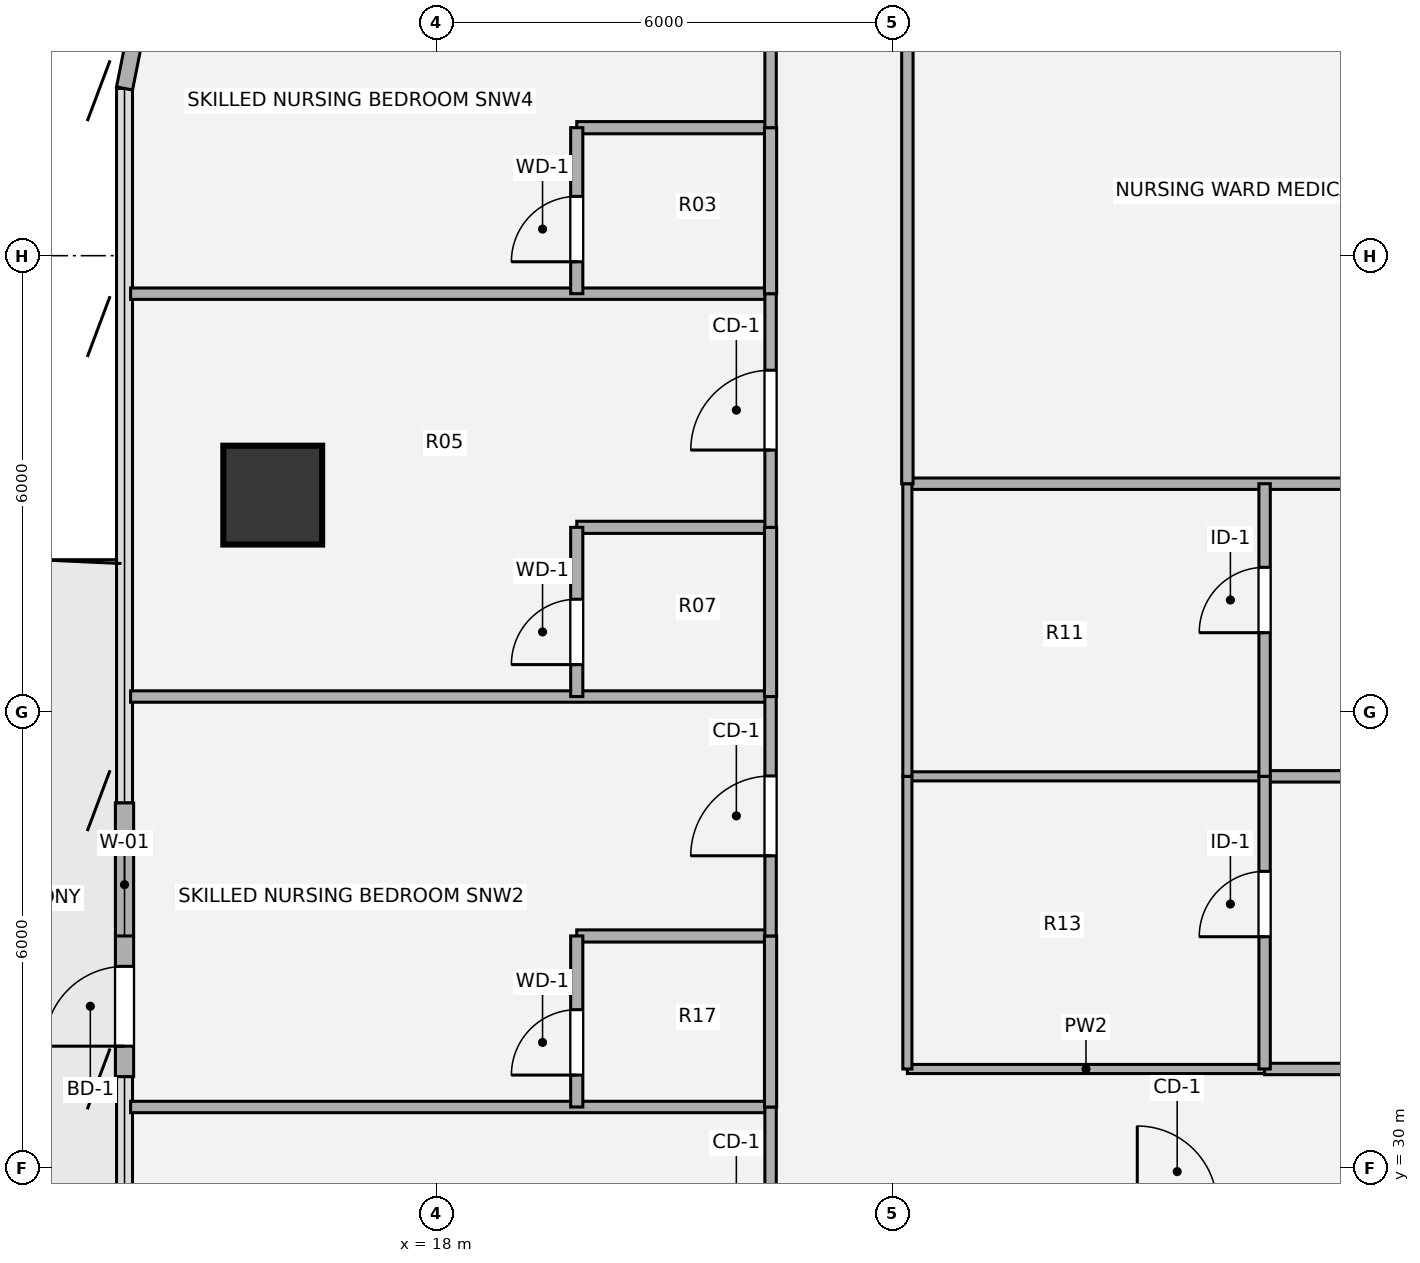
"""IFC4 building model, lengths in metres.
Left out: names, types, materials, properties, quantities, classifications, styles, units other than length and angle.
Written with IfcOpenShell. Run it as: python <this file> out.ifc"""

import sys

from ifc_helpers import new_model, si_unit, direction, frame, frame_2d, origin, origin_2d, place, context, subcontext, project, spatial, rectangle, hollow_circle, extrude, source, transform, mapped, element, fill, save


model = new_model("IFC4")
c1 = context("Model", 3, precision=1e-05, world=origin(), true_north=direction((0.0, 1.0)))
c2 = subcontext(c1, "Body", "Model", "MODEL_VIEW")
j1 = project(units=[si_unit("LENGTHUNIT", "METRE"), si_unit("PLANEANGLEUNIT", "RADIAN")], contexts=[c1])
p1 = place(None, origin())
s1 = spatial("IfcSite", under=j1, at=p1, CompositionType="ELEMENT")
p2 = place(p1, origin())
s2 = spatial("IfcBuilding", under=s1, at=p2, CompositionType="ELEMENT")
p3 = place(p2, frame((0.0, 0.0, 131.4)))
s3 = spatial("IfcBuildingStorey", under=s2, at=p3, CompositionType="ELEMENT", Elevation=131.4)
m1 = source(origin(), c2, "Body", "SweptSolid", [
    extrude(hollow_circle(Radius=0.65, WallThickness=0.045, at=origin_2d()), origin(), (0.0, 0.0, 1.0), 3.78),
])
p4 = place(p3, frame((15.85, 38.85, 0.0), z_axis=(0.0, 0.0, 1.0), x_axis=(1.0, 0.0, 0.0)))
e1 = element("IfcColumn", 1, at=p4, inside=s3, PredefinedType="COLUMN", context=c2, shape_type="MappedRepresentation", body=[
    mapped(m1, transform((0.0, 0.0, 0.0), x_axis=(1.0, 0.0, 0.0), y_axis=(0.0, 1.0, 0.0), z_axis=(0.0, 0.0, 1.0), scale=1.0)),
])
p5 = place(p3, frame((13.9, 31.2, 0.0), z_axis=(0.0, 0.0, 1.0), x_axis=(0.0, 1.0, 0.0)))
e2 = element("IfcWall", 2, at=p5, inside=s3, PredefinedType="SOLIDWALL", context=c2, shape_type="SweptSolid", body=[
    extrude(rectangle(XDim=3.6, YDim=0.24, at=frame_2d((1.8, 0.0))), origin(), (0.0, 0.0, 1.0), 3.53),
])
p6 = place(p5, frame((0.4, 0.0, 0.0)))
e3 = element("IfcOpeningElement", 3, at=p6, cuts=e2, PredefinedType="OPENING", context=c2, shape_type="SweptSolid", body=[
    extrude(rectangle(XDim=1.05, YDim=2.15, at=origin_2d()), frame((0.525, 0.13, 1.075), z_axis=(0.0, -1.0, 0.0), x_axis=(1.0, 0.0, 0.0)), (0.0, 0.0, 1.0), 0.26),
])
p7 = place(p5, frame((1.85, 0.0, 0.85)))
e4 = element("IfcOpeningElement", 4, at=p7, cuts=e2, PredefinedType="OPENING", context=c2, shape_type="SweptSolid", body=[
    extrude(rectangle(XDim=1.35, YDim=1.35, at=origin_2d()), frame((0.675, 0.13, 0.675), z_axis=(0.0, -1.0, 0.0), x_axis=(1.0, 0.0, 0.0)), (0.0, 0.0, 1.0), 0.26),
])
p8 = place(p3, frame((13.9, 44.2, 0.0), z_axis=(0.0, 0.0, 1.0), x_axis=(0.195138390419, 0.980775717779, 0.0)))
e5 = element("IfcWall", 5, at=p8, inside=s3, PredefinedType="SOLIDWALL", context=c2, shape_type="SweptSolid", body=[
    extrude(rectangle(XDim=1.249, YDim=0.215, at=frame_2d((0.624, 0.0))), origin(), (0.0, 0.0, 1.0), 3.53),
])
p9 = place(p3, frame((13.98, 30.8, 0.0), z_axis=(0.0, 0.0, 1.0), x_axis=(1.0, 0.0, 0.0)))
e6 = element("IfcWall", 6, at=p9, inside=s3, PredefinedType="PARTITIONING", context=c2, shape_type="SweptSolid", body=[
    extrude(rectangle(XDim=8.42, YDim=0.15, at=frame_2d((4.21, 0.0))), origin(), (0.0, 0.0, 1.0), 2.982),
])
p10 = place(p3, frame((24.2, 31.3, 0.0), z_axis=(0.0, 0.0, 1.0), x_axis=(1.0, 0.0, 0.0)))
e7 = element("IfcWall", 7, at=p10, inside=s3, PredefinedType="PARTITIONING", context=c2, shape_type="SweptSolid", body=[
    extrude(rectangle(XDim=4.7, YDim=0.12, at=frame_2d((2.35, 0.0))), origin(), (0.0, 0.0, 1.0), 2.982),
])
p11 = place(p3, frame((28.9, 31.3, 0.0), z_axis=(0.0, 0.0, 1.0), x_axis=(1.0, 0.0, 0.0)))
e8 = element("IfcWall", 8, at=p11, inside=s3, PredefinedType="PARTITIONING", context=c2, shape_type="SweptSolid", body=[
    extrude(rectangle(XDim=6.2, YDim=0.15, at=frame_2d((3.1, 0.0))), origin(), (0.0, 0.0, 1.0), 2.982),
])
p12 = place(p3, frame((19.85, 33.05, 0.0), z_axis=(0.0, 0.0, 1.0), x_axis=(1.0, 0.0, 0.0)))
e9 = element("IfcWall", 9, at=p12, inside=s3, PredefinedType="PLUMBINGWALL", context=c2, shape_type="SweptSolid", body=[
    extrude(rectangle(XDim=2.55, YDim=0.16, at=frame_2d((1.275, 0.0))), origin(), (0.0, 0.0, 1.0), 2.982),
])
p13 = place(p3, frame((24.2, 35.15, 0.0), z_axis=(0.0, 0.0, 1.0), x_axis=(1.0, 0.0, 0.0)))
e10 = element("IfcWall", 10, at=p13, inside=s3, PredefinedType="PARTITIONING", context=c2, shape_type="SweptSolid", body=[
    extrude(rectangle(XDim=4.7, YDim=0.12, at=frame_2d((2.35, 0.0))), origin(), (0.0, 0.0, 1.0), 2.982),
])
p14 = place(p3, frame((28.9, 35.15, 0.0), z_axis=(0.0, 0.0, 1.0), x_axis=(1.0, 0.0, 0.0)))
e11 = element("IfcWall", 11, at=p14, inside=s3, PredefinedType="PARTITIONING", context=c2, shape_type="SweptSolid", body=[
    extrude(rectangle(XDim=6.2, YDim=0.15, at=frame_2d((3.1, 0.0))), origin(), (0.0, 0.0, 1.0), 2.982),
])
p15 = place(p3, frame((13.98, 36.2, 0.0), z_axis=(0.0, 0.0, 1.0), x_axis=(1.0, 0.0, 0.0)))
e12 = element("IfcWall", 12, at=p15, inside=s3, PredefinedType="PARTITIONING", context=c2, shape_type="SweptSolid", body=[
    extrude(rectangle(XDim=8.42, YDim=0.15, at=frame_2d((4.21, 0.0))), origin(), (0.0, 0.0, 1.0), 2.982),
])
p16 = place(p3, frame((19.85, 38.426, 0.0), z_axis=(0.0, 0.0, 1.0), x_axis=(1.0, 0.0, 0.0)))
e13 = element("IfcWall", 13, at=p16, inside=s3, PredefinedType="PLUMBINGWALL", context=c2, shape_type="SweptSolid", body=[
    extrude(rectangle(XDim=2.55, YDim=0.16, at=frame_2d((1.275, 0.0))), origin(), (0.0, 0.0, 1.0), 3.055),
])
p17 = place(p3, frame((24.2, 39.0, 0.0), z_axis=(0.0, 0.0, 1.0), x_axis=(1.0, 0.0, 0.0)))
e14 = element("IfcWall", 14, at=p17, inside=s3, PredefinedType="PARTITIONING", context=c2, shape_type="SweptSolid", body=[
    extrude(rectangle(XDim=10.9, YDim=0.15, at=frame_2d((5.45, 0.0))), origin(), (0.0, 0.0, 1.0), 2.903),
])
p18 = place(p3, frame((13.98, 41.5, 0.0), z_axis=(0.0, 0.0, 1.0), x_axis=(1.0, 0.0, 0.0)))
e15 = element("IfcWall", 15, at=p18, inside=s3, PredefinedType="PARTITIONING", context=c2, shape_type="SweptSolid", body=[
    extrude(rectangle(XDim=8.42, YDim=0.15, at=frame_2d((4.21, 0.0))), origin(), (0.0, 0.0, 1.0), 3.5),
])
p19 = place(p3, frame((19.85, 43.684, 0.0), z_axis=(0.0, 0.0, 1.0), x_axis=(1.0, 0.0, 0.0)))
e16 = element("IfcWall", 16, at=p19, inside=s3, PredefinedType="PLUMBINGWALL", context=c2, shape_type="SweptSolid", body=[
    extrude(rectangle(XDim=2.55, YDim=0.16, at=frame_2d((1.275, 0.0))), origin(), (0.0, 0.0, 1.0), 3.5),
])
p20 = place(p3, frame((19.85, 30.8, 0.0), z_axis=(0.0, 0.0, 1.0), x_axis=(0.0, 1.0, 0.0)))
e17 = element("IfcWall", 17, at=p20, inside=s3, PredefinedType="PLUMBINGWALL", context=c2, shape_type="SweptSolid", body=[
    extrude(rectangle(XDim=2.25, YDim=0.16, at=frame_2d((1.125, 0.0))), origin(), (0.0, 0.0, 1.0), 3.5),
])
p21 = place(p20, frame((0.42, 0.0, 0.0)))
e18 = element("IfcOpeningElement", 18, at=p21, cuts=e17, PredefinedType="OPENING", context=c2, shape_type="SweptSolid", body=[
    extrude(rectangle(XDim=0.86, YDim=2.1, at=origin_2d()), frame((0.43, 0.09, 1.05), z_axis=(0.0, -1.0, 0.0), x_axis=(1.0, 0.0, 0.0)), (0.0, 0.0, 1.0), 0.18),
])
p22 = place(p3, frame((19.85, 36.2, 0.0), z_axis=(0.0, 0.0, 1.0), x_axis=(0.0, 1.0, 0.0)))
e19 = element("IfcWall", 19, at=p22, inside=s3, PredefinedType="PLUMBINGWALL", context=c2, shape_type="SweptSolid", body=[
    extrude(rectangle(XDim=2.226, YDim=0.16, at=frame_2d((1.113, 0.0))), origin(), (0.0, 0.0, 1.0), 3.5),
])
p23 = place(p22, frame((0.42, 0.0, 0.0)))
e20 = element("IfcOpeningElement", 20, at=p23, cuts=e19, PredefinedType="OPENING", context=c2, shape_type="SweptSolid", body=[
    extrude(rectangle(XDim=0.86, YDim=2.1, at=origin_2d()), frame((0.43, 0.09, 1.05), z_axis=(0.0, -1.0, 0.0), x_axis=(1.0, 0.0, 0.0)), (0.0, 0.0, 1.0), 0.18),
])
p24 = place(p3, frame((19.85, 41.5, 0.0), z_axis=(0.0, 0.0, 1.0), x_axis=(0.0, 1.0, 0.0)))
e21 = element("IfcWall", 21, at=p24, inside=s3, PredefinedType="PLUMBINGWALL", context=c2, shape_type="SweptSolid", body=[
    extrude(rectangle(XDim=2.184, YDim=0.16, at=frame_2d((1.092, 0.0))), origin(), (0.0, 0.0, 1.0), 3.5),
])
p25 = place(p24, frame((0.42, 0.0, 0.0)))
e22 = element("IfcOpeningElement", 22, at=p25, cuts=e21, PredefinedType="OPENING", context=c2, shape_type="SweptSolid", body=[
    extrude(rectangle(XDim=0.86, YDim=2.1, at=origin_2d()), frame((0.43, 0.09, 1.05), z_axis=(0.0, -1.0, 0.0), x_axis=(1.0, 0.0, 0.0)), (0.0, 0.0, 1.0), 0.18),
])
p26 = place(p3, frame((22.4, 27.65, 0.0), z_axis=(0.0, 0.0, 1.0), x_axis=(0.0, 1.0, 0.0)))
e23 = element("IfcWall", 23, at=p26, inside=s3, PredefinedType="PARTITIONING", context=c2, shape_type="SweptSolid", body=[
    extrude(rectangle(XDim=3.15, YDim=0.15, at=frame_2d((1.575, 0.0))), origin(), (0.0, 0.0, 1.0), 3.5),
])
p27 = place(p26, frame((1.055, 0.0, 0.0)))
e24 = element("IfcOpeningElement", 24, at=p27, cuts=e23, PredefinedType="OPENING", context=c2, shape_type="SweptSolid", body=[
    extrude(rectangle(XDim=1.05, YDim=2.1, at=origin_2d()), frame((0.525, 0.085, 1.05), z_axis=(0.0, -1.0, 0.0), x_axis=(1.0, 0.0, 0.0)), (0.0, 0.0, 1.0), 0.17),
])
p28 = place(p3, frame((22.4, 30.8, 0.0), z_axis=(0.0, 0.0, 1.0), x_axis=(0.0, 1.0, 0.0)))
e25 = element("IfcWall", 25, at=p28, inside=s3, PredefinedType="PLUMBINGWALL", context=c2, shape_type="SweptSolid", body=[
    extrude(rectangle(XDim=2.25, YDim=0.16, at=frame_2d((1.125, 0.0))), origin(), (0.0, 0.0, 1.0), 3.5),
])
p29 = place(p3, frame((22.4, 33.05, 0.0), z_axis=(0.0, 0.0, 1.0), x_axis=(0.0, 1.0, 0.0)))
e26 = element("IfcWall", 26, at=p29, inside=s3, PredefinedType="PARTITIONING", context=c2, shape_type="SweptSolid", body=[
    extrude(rectangle(XDim=3.15, YDim=0.15, at=frame_2d((1.575, 0.0))), origin(), (0.0, 0.0, 1.0), 3.5),
])
p30 = place(p29, frame((1.055, 0.0, 0.0)))
e27 = element("IfcOpeningElement", 27, at=p30, cuts=e26, PredefinedType="OPENING", context=c2, shape_type="SweptSolid", body=[
    extrude(rectangle(XDim=1.05, YDim=2.1, at=origin_2d()), frame((0.525, 0.085, 1.05), z_axis=(0.0, -1.0, 0.0), x_axis=(1.0, 0.0, 0.0)), (0.0, 0.0, 1.0), 0.17),
])
p31 = place(p3, frame((22.4, 36.2, 0.0), z_axis=(0.0, 0.0, 1.0), x_axis=(0.0, 1.0, 0.0)))
e28 = element("IfcWall", 28, at=p31, inside=s3, PredefinedType="PLUMBINGWALL", context=c2, shape_type="SweptSolid", body=[
    extrude(rectangle(XDim=2.226, YDim=0.16, at=frame_2d((1.113, 0.0))), origin(), (0.0, 0.0, 1.0), 3.5),
])
p32 = place(p3, frame((22.4, 38.426, 0.0), z_axis=(0.0, 0.0, 1.0), x_axis=(0.0, 1.0, 0.0)))
e29 = element("IfcWall", 29, at=p32, inside=s3, PredefinedType="PARTITIONING", context=c2, shape_type="SweptSolid", body=[
    extrude(rectangle(XDim=3.074, YDim=0.15, at=frame_2d((1.537, 0.0))), origin(), (0.0, 0.0, 1.0), 3.5),
])
p33 = place(p32, frame((1.017, 0.0, 0.0)))
e30 = element("IfcOpeningElement", 30, at=p33, cuts=e29, PredefinedType="OPENING", context=c2, shape_type="SweptSolid", body=[
    extrude(rectangle(XDim=1.05, YDim=2.1, at=origin_2d()), frame((0.525, 0.085, 1.05), z_axis=(0.0, -1.0, 0.0), x_axis=(1.0, 0.0, 0.0)), (0.0, 0.0, 1.0), 0.17),
])
p34 = place(p3, frame((22.4, 41.5, 0.0), z_axis=(0.0, 0.0, 1.0), x_axis=(0.0, 1.0, 0.0)))
e31 = element("IfcWall", 31, at=p34, inside=s3, PredefinedType="PLUMBINGWALL", context=c2, shape_type="SweptSolid", body=[
    extrude(rectangle(XDim=2.184, YDim=0.16, at=frame_2d((1.092, 0.0))), origin(), (0.0, 0.0, 1.0), 3.5),
])
p35 = place(p3, frame((22.4, 43.684, 0.0), z_axis=(0.0, 0.0, 1.0), x_axis=(0.0, 1.0, 0.0)))
e32 = element("IfcWall", 32, at=p35, inside=s3, PredefinedType="PARTITIONING", context=c2, shape_type="SweptSolid", body=[
    extrude(rectangle(XDim=3.637, YDim=0.15, at=frame_2d((1.818, 0.0))), origin(), (0.0, 0.0, 1.0), 3.5),
])
p36 = place(p35, frame((1.298, 0.0, 0.0)))
e33 = element("IfcOpeningElement", 33, at=p36, cuts=e32, PredefinedType="OPENING", context=c2, shape_type="SweptSolid", body=[
    extrude(rectangle(XDim=1.05, YDim=2.1, at=origin_2d()), frame((0.525, 0.085, 1.05), z_axis=(0.0, -1.0, 0.0), x_axis=(1.0, 0.0, 0.0)), (0.0, 0.0, 1.0), 0.17),
])
p37 = place(p3, frame((24.2, 31.3, 0.0), z_axis=(0.0, 0.0, 1.0), x_axis=(0.0, 1.0, 0.0)))
e34 = element("IfcWall", 34, at=p37, inside=s3, PredefinedType="PARTITIONING", context=c2, shape_type="SweptSolid", body=[
    extrude(rectangle(XDim=3.85, YDim=0.12, at=frame_2d((1.925, 0.0))), origin(), (0.0, 0.0, 1.0), 3.5),
])
p38 = place(p3, frame((24.2, 35.15, 0.0), z_axis=(0.0, 0.0, 1.0), x_axis=(0.0, 1.0, 0.0)))
e35 = element("IfcWall", 35, at=p38, inside=s3, PredefinedType="PARTITIONING", context=c2, shape_type="SweptSolid", body=[
    extrude(rectangle(XDim=3.85, YDim=0.12, at=frame_2d((1.925, 0.0))), origin(), (0.0, 0.0, 1.0), 3.5),
])
p39 = place(p3, frame((24.2, 39.0, 0.0), z_axis=(0.0, 0.0, 1.0), x_axis=(0.0, 1.0, 0.0)))
e36 = element("IfcWall", 36, at=p39, inside=s3, PredefinedType="PARTITIONING", context=c2, shape_type="SweptSolid", body=[
    extrude(rectangle(XDim=8.321, YDim=0.15, at=frame_2d((4.16, 0.0))), origin(), (0.0, 0.0, 1.0), 3.5),
])
p40 = place(p3, frame((28.9, 31.3, 0.0), z_axis=(0.0, 0.0, 1.0), x_axis=(0.0, 1.0, 0.0)))
e37 = element("IfcWall", 37, at=p40, inside=s3, PredefinedType="PARTITIONING", context=c2, shape_type="SweptSolid", body=[
    extrude(rectangle(XDim=3.85, YDim=0.15, at=frame_2d((1.925, 0.0))), origin(), (0.0, 0.0, 1.0), 3.5),
])
p41 = place(p40, frame((1.74, 0.0, 0.0)))
e38 = element("IfcOpeningElement", 38, at=p41, cuts=e37, PredefinedType="OPENING", context=c2, shape_type="SweptSolid", body=[
    extrude(rectangle(XDim=0.86, YDim=2.1, at=origin_2d()), frame((0.43, 0.085, 1.05), z_axis=(0.0, -1.0, 0.0), x_axis=(1.0, 0.0, 0.0)), (0.0, 0.0, 1.0), 0.17),
])
p42 = place(p3, frame((28.9, 35.15, 0.0), z_axis=(0.0, 0.0, 1.0), x_axis=(0.0, 1.0, 0.0)))
e39 = element("IfcWall", 39, at=p42, inside=s3, PredefinedType="PARTITIONING", context=c2, shape_type="SweptSolid", body=[
    extrude(rectangle(XDim=3.85, YDim=0.15, at=frame_2d((1.925, 0.0))), origin(), (0.0, 0.0, 1.0), 3.5),
])
p43 = place(p42, frame((1.89, 0.0, 0.0)))
e40 = element("IfcOpeningElement", 40, at=p43, cuts=e39, PredefinedType="OPENING", context=c2, shape_type="SweptSolid", body=[
    extrude(rectangle(XDim=0.86, YDim=2.1, at=origin_2d()), frame((0.43, 0.085, 1.05), z_axis=(0.0, -1.0, 0.0), x_axis=(1.0, 0.0, 0.0)), (0.0, 0.0, 1.0), 0.17),
])
m2 = source(origin(), c2, "Body", "SweptSolid", [
    extrude(rectangle(XDim=1.05, YDim=2.15, at=origin_2d()), frame((0.525, 0.025, 1.075), z_axis=(0.0, -1.0, 0.0), x_axis=(1.0, 0.0, 0.0)), (0.0, 0.0, 1.0), 0.05),
])
p44 = place(p6, origin())
e41 = element("IfcDoor", 41, at=p44, inside=s3, OperationType="SINGLE_SWING_LEFT", PredefinedType="DOOR", context=c2, shape_type="MappedRepresentation", body=[
    mapped(m2, transform((0.0, 0.0, 0.0), x_axis=(1.0, 0.0, 0.0), y_axis=(0.0, 1.0, 0.0), z_axis=(0.0, 0.0, 1.0), scale=1.0)),
])
fill(e3, e41)
m3 = source(origin(), c2, "Body", "SweptSolid", [
    extrude(rectangle(XDim=1.35, YDim=1.35, at=origin_2d()), frame((0.675, 0.03, 0.675), z_axis=(0.0, -1.0, 0.0), x_axis=(1.0, 0.0, 0.0)), (0.0, 0.0, 1.0), 0.06),
])
p45 = place(p7, origin())
e42 = element("IfcWindow", 42, at=p45, inside=s3, PartitioningType="SINGLE_PANEL", PredefinedType="WINDOW", context=c2, shape_type="MappedRepresentation", body=[
    mapped(m3, transform((0.0, 0.0, 0.0), x_axis=(1.0, 0.0, 0.0), y_axis=(0.0, 1.0, 0.0), z_axis=(0.0, 0.0, 1.0), scale=1.0)),
])
fill(e4, e42)
m4 = source(origin(), c2, "Body", "SweptSolid", [
    extrude(rectangle(XDim=0.86, YDim=2.1, at=origin_2d()), frame((0.43, 0.025, 1.05), z_axis=(0.0, -1.0, 0.0), x_axis=(1.0, 0.0, 0.0)), (0.0, 0.0, 1.0), 0.05),
])
p46 = place(p21, origin())
e43 = element("IfcDoor", 43, at=p46, inside=s3, OperationType="SINGLE_SWING_LEFT", PredefinedType="DOOR", context=c2, shape_type="MappedRepresentation", body=[
    mapped(m4, transform((0.0, 0.0, 0.0), x_axis=(1.0, 0.0, 0.0), y_axis=(0.0, 1.0, 0.0), z_axis=(0.0, 0.0, 1.0), scale=1.0)),
])
fill(e18, e43)
p47 = place(p23, origin())
e44 = element("IfcDoor", 44, at=p47, inside=s3, OperationType="SINGLE_SWING_LEFT", PredefinedType="DOOR", context=c2, shape_type="MappedRepresentation", body=[
    mapped(m4, transform((0.0, 0.0, 0.0), x_axis=(1.0, 0.0, 0.0), y_axis=(0.0, 1.0, 0.0), z_axis=(0.0, 0.0, 1.0), scale=1.0)),
])
fill(e20, e44)
p48 = place(p25, origin())
e45 = element("IfcDoor", 45, at=p48, inside=s3, OperationType="SINGLE_SWING_LEFT", PredefinedType="DOOR", context=c2, shape_type="MappedRepresentation", body=[
    mapped(m4, transform((0.0, 0.0, 0.0), x_axis=(1.0, 0.0, 0.0), y_axis=(0.0, 1.0, 0.0), z_axis=(0.0, 0.0, 1.0), scale=1.0)),
])
fill(e22, e45)
m5 = source(origin(), c2, "Body", "SweptSolid", [
    extrude(rectangle(XDim=1.05, YDim=2.1, at=origin_2d()), frame((0.525, 0.025, 1.05), z_axis=(0.0, -1.0, 0.0), x_axis=(1.0, 0.0, 0.0)), (0.0, 0.0, 1.0), 0.05),
])
p49 = place(p30, origin())
e46 = element("IfcDoor", 46, at=p49, inside=s3, OperationType="SINGLE_SWING_LEFT", PredefinedType="DOOR", context=c2, shape_type="MappedRepresentation", body=[
    mapped(m5, transform((0.0, 0.0, 0.0), x_axis=(1.0, 0.0, 0.0), y_axis=(0.0, 1.0, 0.0), z_axis=(0.0, 0.0, 1.0), scale=1.0)),
])
fill(e27, e46)
p50 = place(p33, origin())
e47 = element("IfcDoor", 47, at=p50, inside=s3, OperationType="SINGLE_SWING_LEFT", PredefinedType="DOOR", context=c2, shape_type="MappedRepresentation", body=[
    mapped(m5, transform((0.0, 0.0, 0.0), x_axis=(1.0, 0.0, 0.0), y_axis=(0.0, 1.0, 0.0), z_axis=(0.0, 0.0, 1.0), scale=1.0)),
])
fill(e30, e47)
m6 = source(origin(), c2, "Body", "SweptSolid", [
    extrude(rectangle(XDim=0.86, YDim=2.1, at=origin_2d()), frame((0.43, 0.025, 1.05), z_axis=(0.0, -1.0, 0.0), x_axis=(1.0, 0.0, 0.0)), (0.0, 0.0, 1.0), 0.05),
])
p51 = place(p41, origin())
e48 = element("IfcDoor", 48, at=p51, inside=s3, OperationType="SINGLE_SWING_LEFT", PredefinedType="DOOR", context=c2, shape_type="MappedRepresentation", body=[
    mapped(m6, transform((0.0, 0.0, 0.0), x_axis=(1.0, 0.0, 0.0), y_axis=(0.0, 1.0, 0.0), z_axis=(0.0, 0.0, 1.0), scale=1.0)),
])
fill(e38, e48)
p52 = place(p43, origin())
e49 = element("IfcDoor", 49, at=p52, inside=s3, OperationType="SINGLE_SWING_LEFT", PredefinedType="DOOR", context=c2, shape_type="MappedRepresentation", body=[
    mapped(m6, transform((0.0, 0.0, 0.0), x_axis=(1.0, 0.0, 0.0), y_axis=(0.0, 1.0, 0.0), z_axis=(0.0, 0.0, 1.0), scale=1.0)),
])
fill(e40, e49)
save(model, sys.argv[1])
